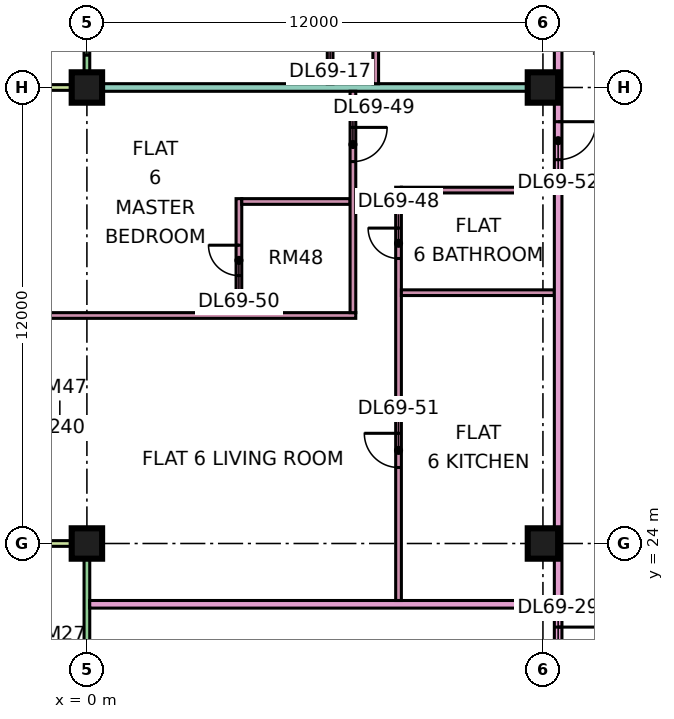
"""IFC4 building model, lengths in metres.
Left out: names, types, materials, properties, quantities, classifications, styles, units other than length and angle.
Written with IfcOpenShell. Run it as: python <this file> out.ifc"""

import sys

from ifc_helpers import new_model, si_unit, direction, frame, frame_2d, origin, origin_2d, place, context, subcontext, project, spatial, rectangle, extrude, element, fill, save


model = new_model("IFC4")
c1 = context("Model", 3, precision=1e-05, world=origin(), true_north=direction((0.0, 1.0)))
c2 = subcontext(c1, "Body", "Model", "MODEL_VIEW")
j1 = project(units=[si_unit("LENGTHUNIT", "METRE"), si_unit("PLANEANGLEUNIT", "RADIAN")], contexts=[c1])
p1 = place(None, origin())
s1 = spatial("IfcSite", under=j1, at=p1, CompositionType="ELEMENT")
p2 = place(p1, origin())
s2 = spatial("IfcBuilding", under=s1, at=p2, CompositionType="ELEMENT")
p3 = place(p2, frame((0.0, 0.0, 295.9)))
s3 = spatial("IfcBuildingStorey", under=s2, at=p3, CompositionType="ELEMENT", Elevation=295.9)
p4 = place(p3, frame((0.0, 24.0, 0.0), z_axis=(0.0, 0.0, 1.0), x_axis=(1.0, 0.0, 0.0)))
e1 = element("IfcColumn", 1, at=p4, inside=s3, PredefinedType="COLUMN", context=c2, shape_type="SweptSolid", body=[
    extrude(rectangle(XDim=0.8, YDim=0.8, at=origin_2d()), origin(), (0.0, 0.0, 1.0), 3.75),
])
p5 = place(p3, frame((0.0, 36.0, 0.0), z_axis=(0.0, 0.0, 1.0), x_axis=(1.0, 0.0, 0.0)))
e2 = element("IfcColumn", 2, at=p5, inside=s3, PredefinedType="COLUMN", context=c2, shape_type="SweptSolid", body=[
    extrude(rectangle(XDim=0.8, YDim=0.8, at=origin_2d()), origin(), (0.0, 0.0, 1.0), 3.75),
])
for number, where, z_axis, x_axis in (
    (3, (12.0, 24.0, 0.0), (0.0, 0.0, 1.0), (1.0, 0.0, 0.0)),
    (4, (12.0, 36.0, 0.0), (0.0, 0.0, 1.0), (1.0, 0.0, 0.0)),
):
    element("IfcColumn", number, at=place(p3, frame(where, z_axis=z_axis, x_axis=x_axis)), inside=s3, PredefinedType="COLUMN", context=c2, shape_type="SweptSolid", body=[
        extrude(rectangle(XDim=0.8, YDim=0.8, at=origin_2d()), origin(), (0.0, 0.0, 1.0), 3.75),
    ])
p6 = place(p3, frame((0.0, 47.925, 0.0), z_axis=(0.0, 0.0, 1.0), x_axis=(0.0, -1.0, 0.0)))
e5 = element("IfcWall", 5, at=p6, inside=s3, PredefinedType="SOLIDWALL", context=c2, shape_type="SweptSolid", body=[
    extrude(rectangle(XDim=11.85, YDim=0.15, at=frame_2d((5.925, 0.0))), origin(), (0.0, 0.0, 1.0), 3.35),
])
p7 = place(p6, frame((0.613, 0.0, 0.0)))
e6 = element("IfcOpeningElement", 6, at=p7, cuts=e5, PredefinedType="OPENING", context=c2, shape_type="SweptSolid", body=[
    extrude(rectangle(XDim=1.2, YDim=2.4, at=frame_2d((0.6, 1.2))), frame((0.0, 0.085, 0.0), z_axis=(0.0, -1.0, 0.0), x_axis=(1.0, 0.0, 0.0)), (0.0, 0.0, 1.0), 0.17),
])
p8 = place(p6, frame((3.775, 0.0, 0.45)))
e7 = element("IfcOpeningElement", 7, at=p8, cuts=e5, PredefinedType="OPENING", context=c2, shape_type="SweptSolid", body=[
    extrude(rectangle(XDim=1.8, YDim=2.4, at=frame_2d((0.9, 1.2))), frame((0.0, 0.085, 0.0), z_axis=(0.0, -1.0, 0.0), x_axis=(1.0, 0.0, 0.0)), (0.0, 0.0, 1.0), 0.17),
])
p9 = place(p6, frame((6.525, 0.0, 0.45)))
e8 = element("IfcOpeningElement", 8, at=p9, cuts=e5, PredefinedType="OPENING", context=c2, shape_type="SweptSolid", body=[
    extrude(rectangle(XDim=1.8, YDim=2.4, at=frame_2d((0.9, 1.2))), frame((0.0, 0.085, 0.0), z_axis=(0.0, -1.0, 0.0), x_axis=(1.0, 0.0, 0.0)), (0.0, 0.0, 1.0), 0.17),
])
p10 = place(p6, frame((9.275, 0.0, 0.45)))
e9 = element("IfcOpeningElement", 9, at=p10, cuts=e5, PredefinedType="OPENING", context=c2, shape_type="SweptSolid", body=[
    extrude(rectangle(XDim=1.8, YDim=2.4, at=frame_2d((0.9, 1.2))), frame((0.0, 0.085, 0.0), z_axis=(0.0, -1.0, 0.0), x_axis=(1.0, 0.0, 0.0)), (0.0, 0.0, 1.0), 0.17),
])
p11 = place(p3, frame((-1.5, 36.0, 0.0), z_axis=(0.0, 0.0, 1.0), x_axis=(1.0, 0.0, 0.0)))
e10 = element("IfcWall", 10, at=p11, inside=s3, PredefinedType="SOLIDWALL", context=c2, shape_type="SweptSolid", body=[
    extrude(rectangle(XDim=1.5, YDim=0.15, at=frame_2d((0.75, 0.0))), origin(), (0.0, 0.0, 1.0), 3.35),
])
p12 = place(p3, frame((0.0, 23.925, 0.0), z_axis=(0.0, 0.0, 1.0), x_axis=(0.0, -1.0, 0.0)))
e11 = element("IfcWall", 11, at=p12, inside=s3, PredefinedType="SOLIDWALL", context=c2, shape_type="SweptSolid", body=[
    extrude(rectangle(XDim=11.35, YDim=0.15, at=frame_2d((5.675, 0.0))), origin(), (0.0, 0.0, 1.0), 3.35),
])
p13 = place(p12, frame((6.738, 0.0, 0.0)))
e12 = element("IfcOpeningElement", 12, at=p13, cuts=e11, PredefinedType="OPENING", context=c2, shape_type="SweptSolid", body=[
    extrude(rectangle(XDim=1.8, YDim=2.4, at=frame_2d((0.9, 1.2))), frame((0.0, 0.085, 0.0), z_axis=(0.0, -1.0, 0.0), x_axis=(1.0, 0.0, 0.0)), (0.0, 0.0, 1.0), 0.17),
])
p14 = place(p3, frame((-1.5, 24.0, 0.0), z_axis=(0.0, 0.0, 1.0), x_axis=(1.0, 0.0, 0.0)))
e13 = element("IfcWall", 13, at=p14, inside=s3, PredefinedType="SOLIDWALL", context=c2, shape_type="SweptSolid", body=[
    extrude(rectangle(XDim=1.5, YDim=0.15, at=frame_2d((0.75, 0.0))), origin(), (0.0, 0.0, 1.0), 3.35),
])
p15 = place(p3, frame((-1.35, 30.0, 0.0), z_axis=(0.0, 0.0, 1.0), x_axis=(1.0, 0.0, 0.0)))
e14 = element("IfcWall", 14, at=p15, inside=s3, PredefinedType="PARTITIONING", context=c2, shape_type="SweptSolid", body=[
    extrude(rectangle(XDim=8.425, YDim=0.15, at=frame_2d((4.212, 0.0))), origin(), (0.0, 0.0, 1.0), 3.35),
])
e15 = element("IfcWall", 15, at=p5, inside=s3, PredefinedType="PARTITIONING", context=c2, shape_type="SweptSolid", body=[
    extrude(rectangle(XDim=12.3, YDim=0.2, at=frame_2d((6.15, 0.0))), origin(), (0.0, 0.0, 1.0), 3.35),
])
p16 = place(p3, frame((0.074, 22.4, 0.0), z_axis=(0.0, 0.0, 1.0), x_axis=(1.0, 0.0, 0.0)))
e16 = element("IfcWall", 16, at=p16, inside=s3, PredefinedType="PARTITIONING", context=c2, shape_type="SweptSolid", body=[
    extrude(rectangle(XDim=12.226, YDim=0.2, at=frame_2d((6.113, 0.0))), origin(), (0.0, 0.0, 1.0), 3.35),
])
p17 = place(p3, frame((4.0, 30.075, 0.0), z_axis=(0.0, 0.0, 1.0), x_axis=(0.0, 1.0, 0.0)))
e17 = element("IfcWall", 17, at=p17, inside=s3, PredefinedType="PARTITIONING", context=c2, shape_type="SweptSolid", body=[
    extrude(rectangle(XDim=3.0, YDim=0.15, at=frame_2d((1.5, 0.0))), origin(), (0.0, 0.0, 1.0), 3.35),
])
p18 = place(p17, frame((0.975, 0.0, 0.0)))
e18 = element("IfcOpeningElement", 18, at=p18, cuts=e17, PredefinedType="OPENING", context=c2, shape_type="SweptSolid", body=[
    extrude(rectangle(XDim=0.8, YDim=2.1, at=frame_2d((0.4, 1.05))), frame((0.0, 0.085, 0.0), z_axis=(0.0, -1.0, 0.0), x_axis=(1.0, 0.0, 0.0)), (0.0, 0.0, 1.0), 0.17),
])
p19 = place(p3, frame((4.075, 33.0, 0.0), z_axis=(0.0, 0.0, 1.0), x_axis=(1.0, 0.0, 0.0)))
e19 = element("IfcWall", 19, at=p19, inside=s3, PredefinedType="PARTITIONING", context=c2, shape_type="SweptSolid", body=[
    extrude(rectangle(XDim=2.85, YDim=0.15, at=frame_2d((1.425, 0.0))), origin(), (0.0, 0.0, 1.0), 3.35),
])
p20 = place(p3, frame((6.4, 36.1, 0.0), z_axis=(0.0, 0.0, 1.0), x_axis=(0.0, 1.0, 0.0)))
e20 = element("IfcWall", 20, at=p20, inside=s3, PredefinedType="PARTITIONING", context=c2, shape_type="SweptSolid", body=[
    extrude(rectangle(XDim=8.95, YDim=0.15, at=frame_2d((4.475, 0.0))), origin(), (0.0, 0.0, 1.0), 3.35),
])
p21 = place(p20, frame((0.95, 0.0, 0.0)))
e21 = element("IfcOpeningElement", 21, at=p21, cuts=e20, PredefinedType="OPENING", context=c2, shape_type="SweptSolid", body=[
    extrude(rectangle(XDim=0.9, YDim=2.1, at=frame_2d((0.45, 1.05))), frame((0.0, 0.085, 0.0), z_axis=(0.0, -1.0, 0.0), x_axis=(1.0, 0.0, 0.0)), (0.0, 0.0, 1.0), 0.17),
])
p22 = place(p20, frame((6.95, 0.0, 0.0)))
e22 = element("IfcOpeningElement", 22, at=p22, cuts=e20, PredefinedType="OPENING", context=c2, shape_type="SweptSolid", body=[
    extrude(rectangle(XDim=0.9, YDim=2.1, at=frame_2d((0.45, 1.05))), frame((0.0, 0.085, 0.0), z_axis=(0.0, -1.0, 0.0), x_axis=(1.0, 0.0, 0.0)), (0.0, 0.0, 1.0), 0.17),
])
p23 = place(p20, frame((4.8, 0.0, 0.0)))
e23 = element("IfcOpeningElement", 23, at=p23, cuts=e20, PredefinedType="OPENING", context=c2, shape_type="SweptSolid", body=[
    extrude(rectangle(XDim=0.8, YDim=2.1, at=frame_2d((0.4, 1.05))), frame((0.0, 0.085, 0.0), z_axis=(0.0, -1.0, 0.0), x_axis=(1.0, 0.0, 0.0)), (0.0, 0.0, 1.0), 0.17),
])
p24 = place(p3, frame((7.0, 30.075, 0.0), z_axis=(0.0, 0.0, 1.0), x_axis=(0.0, 1.0, 0.0)))
e24 = element("IfcWall", 24, at=p24, inside=s3, PredefinedType="PARTITIONING", context=c2, shape_type="SweptSolid", body=[
    extrude(rectangle(XDim=5.825, YDim=0.15, at=frame_2d((2.913, 0.0))), origin(), (0.0, 0.0, 1.0), 3.35),
])
p25 = place(p24, frame((3.975, 0.0, 0.0)))
e25 = element("IfcOpeningElement", 25, at=p25, cuts=e24, PredefinedType="OPENING", context=c2, shape_type="SweptSolid", body=[
    extrude(rectangle(XDim=0.9, YDim=2.1, at=frame_2d((0.45, 1.05))), frame((0.0, 0.085, 0.0), z_axis=(0.0, -1.0, 0.0), x_axis=(1.0, 0.0, 0.0)), (0.0, 0.0, 1.0), 0.17),
])
p26 = place(p3, frame((7.6, 36.1, 0.0), z_axis=(0.0, 0.0, 1.0), x_axis=(0.0, 1.0, 0.0)))
e26 = element("IfcWall", 26, at=p26, inside=s3, PredefinedType="PARTITIONING", context=c2, shape_type="SweptSolid", body=[
    extrude(rectangle(XDim=15.275, YDim=0.15, at=frame_2d((7.637, 0.0))), origin(), (0.0, 0.0, 1.0), 3.35),
])
p27 = place(p26, frame((12.8, 0.0, 0.0)))
e27 = element("IfcOpeningElement", 27, at=p27, cuts=e26, PredefinedType="OPENING", context=c2, shape_type="SweptSolid", body=[
    extrude(rectangle(XDim=0.8, YDim=2.1, at=frame_2d((0.4, 1.05))), frame((0.0, 0.085, 0.0), z_axis=(0.0, -1.0, 0.0), x_axis=(1.0, 0.0, 0.0)), (0.0, 0.0, 1.0), 0.17),
])
p28 = place(p26, frame((2.6, 0.0, 0.0)))
e28 = element("IfcOpeningElement", 28, at=p28, cuts=e26, PredefinedType="OPENING", context=c2, shape_type="SweptSolid", body=[
    extrude(rectangle(XDim=0.9, YDim=2.1, at=frame_2d((0.45, 1.05))), frame((0.0, 0.085, 0.0), z_axis=(0.0, -1.0, 0.0), x_axis=(1.0, 0.0, 0.0)), (0.0, 0.0, 1.0), 0.17),
])
p29 = place(p26, frame((6.95, 0.0, 0.0)))
e29 = element("IfcOpeningElement", 29, at=p29, cuts=e26, PredefinedType="OPENING", context=c2, shape_type="SweptSolid", body=[
    extrude(rectangle(XDim=0.8, YDim=2.1, at=frame_2d((0.4, 1.05))), frame((0.0, 0.085, 0.0), z_axis=(0.0, -1.0, 0.0), x_axis=(1.0, 0.0, 0.0)), (0.0, 0.0, 1.0), 0.17),
])
p30 = place(p26, frame((9.5, 0.0, 0.0)))
e30 = element("IfcOpeningElement", 30, at=p30, cuts=e26, PredefinedType="OPENING", context=c2, shape_type="SweptSolid", body=[
    extrude(rectangle(XDim=0.8, YDim=2.1, at=frame_2d((0.4, 1.05))), frame((0.0, 0.085, 0.0), z_axis=(0.0, -1.0, 0.0), x_axis=(1.0, 0.0, 0.0)), (0.0, 0.0, 1.0), 0.17),
])
p31 = place(p3, frame((8.2, 22.5, 0.0), z_axis=(0.0, 0.0, 1.0), x_axis=(0.0, 1.0, 0.0)))
e31 = element("IfcWall", 31, at=p31, inside=s3, PredefinedType="PARTITIONING", context=c2, shape_type="SweptSolid", body=[
    extrude(rectangle(XDim=10.875, YDim=0.15, at=frame_2d((5.438, 0.0))), origin(), (0.0, 0.0, 1.0), 3.35),
])
p32 = place(p31, frame((9.0, 0.0, 0.0)))
e32 = element("IfcOpeningElement", 32, at=p32, cuts=e31, PredefinedType="OPENING", context=c2, shape_type="SweptSolid", body=[
    extrude(rectangle(XDim=0.8, YDim=2.1, at=frame_2d((0.4, 1.05))), frame((0.0, 0.085, 0.0), z_axis=(0.0, -1.0, 0.0), x_axis=(1.0, 0.0, 0.0)), (0.0, 0.0, 1.0), 0.17),
])
p33 = place(p31, frame((3.5, 0.0, 0.0)))
e33 = element("IfcOpeningElement", 33, at=p33, cuts=e31, PredefinedType="OPENING", context=c2, shape_type="SweptSolid", body=[
    extrude(rectangle(XDim=0.9, YDim=2.1, at=frame_2d((0.45, 1.05))), frame((0.0, 0.085, 0.0), z_axis=(0.0, -1.0, 0.0), x_axis=(1.0, 0.0, 0.0)), (0.0, 0.0, 1.0), 0.17),
])
for number, where, z_axis, x_axis in (
    (34, (8.275, 30.6, 0.0), (0.0, 0.0, 1.0), (1.0, 0.0, 0.0)),
    (35, (8.275, 33.3, 0.0), (0.0, 0.0, 1.0), (1.0, 0.0, 0.0)),
):
    element("IfcWall", number, at=place(p3, frame(where, z_axis=z_axis, x_axis=x_axis)), inside=s3, PredefinedType="PARTITIONING", context=c2, shape_type="SweptSolid", body=[
        extrude(rectangle(XDim=4.025, YDim=0.15, at=frame_2d((2.013, 0.0))), origin(), (0.0, 0.0, 1.0), 3.35),
    ])
p34 = place(p3, frame((12.4, 20.0, 0.0), z_axis=(0.0, 0.0, 1.0), x_axis=(0.0, 1.0, 0.0)))
e36 = element("IfcWall", 36, at=p34, inside=s3, PredefinedType="PARTITIONING", context=c2, shape_type="SweptSolid", body=[
    extrude(rectangle(XDim=33.926, YDim=0.2, at=frame_2d((16.963, 0.0))), origin(), (0.0, 0.0, 1.0), 3.35),
])
p35 = place(p34, frame((32.1, 0.0, 0.0)))
e37 = element("IfcOpeningElement", 37, at=p35, cuts=e36, PredefinedType="OPENING", context=c2, shape_type="SweptSolid", body=[
    extrude(rectangle(XDim=1.0, YDim=2.1, at=frame_2d((0.5, 1.05))), frame((0.0, 0.11, 0.0), z_axis=(0.0, -1.0, 0.0), x_axis=(1.0, 0.0, 0.0)), (0.0, 0.0, 1.0), 0.22),
])
p36 = place(p34, frame((0.6, 0.0, 0.0)))
e38 = element("IfcOpeningElement", 38, at=p36, cuts=e36, PredefinedType="OPENING", context=c2, shape_type="SweptSolid", body=[
    extrude(rectangle(XDim=1.2, YDim=2.1, at=frame_2d((0.6, 1.05))), frame((0.0, 0.11, 0.0), z_axis=(0.0, -1.0, 0.0), x_axis=(1.0, 0.0, 0.0)), (0.0, 0.0, 1.0), 0.22),
])
p37 = place(p34, frame((14.1, 0.0, 0.0)))
e39 = element("IfcOpeningElement", 39, at=p37, cuts=e36, PredefinedType="OPENING", context=c2, shape_type="SweptSolid", body=[
    extrude(rectangle(XDim=1.0, YDim=2.1, at=frame_2d((0.5, 1.05))), frame((0.0, 0.11, 0.0), z_axis=(0.0, -1.0, 0.0), x_axis=(1.0, 0.0, 0.0)), (0.0, 0.0, 1.0), 0.22),
])
p38 = place(p10, origin())
e40 = element("IfcWindow", 40, at=p38, inside=s3, PartitioningType="SINGLE_PANEL", PredefinedType="WINDOW", context=c2, shape_type="SweptSolid", body=[
    extrude(rectangle(XDim=1.8, YDim=2.4, at=frame_2d((0.9, 1.2))), frame((0.0, 0.03, 0.0), z_axis=(0.0, -1.0, 0.0), x_axis=(1.0, 0.0, 0.0)), (0.0, 0.0, 1.0), 0.06),
])
fill(e9, e40)
p39 = place(p36, origin())
e41 = element("IfcDoor", 41, at=p39, inside=s3, OperationType="SINGLE_SWING_RIGHT", PredefinedType="DOOR", context=c2, shape_type="SweptSolid", body=[
    extrude(rectangle(XDim=1.2, YDim=2.1, at=frame_2d((0.6, 1.05))), frame((0.0, 0.025, 0.0), z_axis=(0.0, -1.0, 0.0), x_axis=(1.0, 0.0, 0.0)), (0.0, 0.0, 1.0), 0.05),
])
fill(e38, e41)
p40 = place(p32, frame((0.8, 0.0, 0.0), z_axis=(0.0, 0.0, 1.0), x_axis=(-1.0, 0.0, 0.0)))
e42 = element("IfcDoor", 42, at=p40, inside=s3, OperationType="SINGLE_SWING_RIGHT", PredefinedType="DOOR", context=c2, shape_type="SweptSolid", body=[
    extrude(rectangle(XDim=0.8, YDim=2.1, at=frame_2d((0.4, 1.05))), frame((0.0, 0.025, 0.0), z_axis=(0.0, -1.0, 0.0), x_axis=(1.0, 0.0, 0.0)), (0.0, 0.0, 1.0), 0.05),
])
fill(e32, e42)
p41 = place(p25, origin())
e43 = element("IfcDoor", 43, at=p41, inside=s3, OperationType="SINGLE_SWING_RIGHT", PredefinedType="DOOR", context=c2, shape_type="SweptSolid", body=[
    extrude(rectangle(XDim=0.9, YDim=2.1, at=frame_2d((0.45, 1.05))), frame((0.0, 0.025, 0.0), z_axis=(0.0, -1.0, 0.0), x_axis=(1.0, 0.0, 0.0)), (0.0, 0.0, 1.0), 0.05),
])
fill(e25, e43)
p42 = place(p18, frame((0.8, 0.0, 0.0), z_axis=(0.0, 0.0, 1.0), x_axis=(-1.0, 0.0, 0.0)))
e44 = element("IfcDoor", 44, at=p42, inside=s3, OperationType="SINGLE_SWING_RIGHT", PredefinedType="DOOR", context=c2, shape_type="SweptSolid", body=[
    extrude(rectangle(XDim=0.8, YDim=2.1, at=frame_2d((0.4, 1.05))), frame((0.0, 0.025, 0.0), z_axis=(0.0, -1.0, 0.0), x_axis=(1.0, 0.0, 0.0)), (0.0, 0.0, 1.0), 0.05),
])
fill(e18, e44)
p43 = place(p33, frame((0.9, 0.0, 0.0), z_axis=(0.0, 0.0, 1.0), x_axis=(-1.0, 0.0, 0.0)))
e45 = element("IfcDoor", 45, at=p43, inside=s3, OperationType="SINGLE_SWING_RIGHT", PredefinedType="DOOR", context=c2, shape_type="SweptSolid", body=[
    extrude(rectangle(XDim=0.9, YDim=2.1, at=frame_2d((0.45, 1.05))), frame((0.0, 0.025, 0.0), z_axis=(0.0, -1.0, 0.0), x_axis=(1.0, 0.0, 0.0)), (0.0, 0.0, 1.0), 0.05),
])
fill(e33, e45)
p44 = place(p37, origin())
e46 = element("IfcDoor", 46, at=p44, inside=s3, OperationType="SINGLE_SWING_RIGHT", PredefinedType="DOOR", context=c2, shape_type="SweptSolid", body=[
    extrude(rectangle(XDim=1.0, YDim=2.1, at=frame_2d((0.5, 1.05))), frame((0.0, 0.025, 0.0), z_axis=(0.0, -1.0, 0.0), x_axis=(1.0, 0.0, 0.0)), (0.0, 0.0, 1.0), 0.05),
])
fill(e39, e46)
save(model, sys.argv[1])
